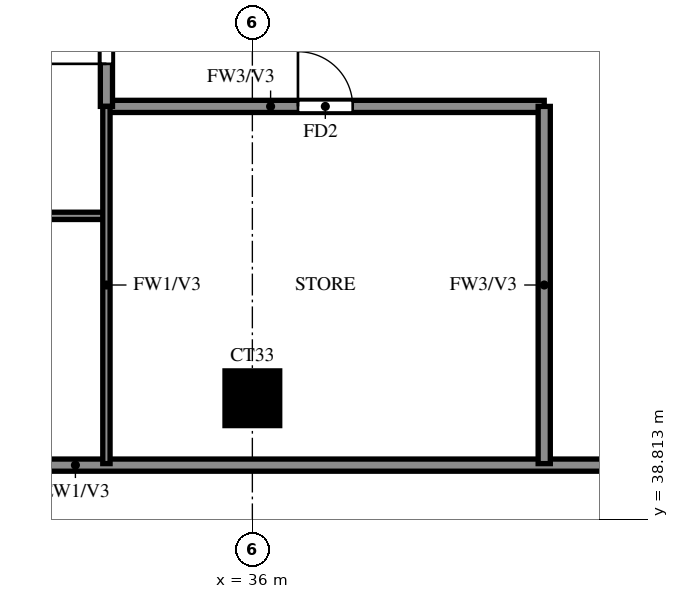
"""IFC4 building model, lengths in metres.
Left out: names, types, materials, properties, quantities, classifications, styles, units other than length and angle.
Written with IfcOpenShell. Run it as: python <this file> out.ifc"""

import sys

from ifc_helpers import new_model, si_unit, direction, frame, frame_2d, origin, origin_2d, place, context, subcontext, project, spatial, rectangle, extrude, source, transform, mapped, element, fill, save


model = new_model("IFC4")
c1 = context("Model", 3, precision=1e-05, world=origin(), true_north=direction((0.0, 1.0)))
c2 = subcontext(c1, "Body", "Model", "MODEL_VIEW")
j1 = project(units=[si_unit("LENGTHUNIT", "METRE"), si_unit("PLANEANGLEUNIT", "RADIAN")], contexts=[c1])
p1 = place(None, origin())
s1 = spatial("IfcSite", under=j1, at=p1, CompositionType="ELEMENT")
p2 = place(p1, origin())
s2 = spatial("IfcBuilding", under=s1, at=p2, CompositionType="ELEMENT")
p3 = place(p2, frame((0.0, 0.0, 229.0)))
s3 = spatial("IfcBuildingStorey", under=s2, at=p3, CompositionType="ELEMENT", Elevation=229.0)
m1 = source(origin(), c2, "Body", "SweptSolid", [
    extrude(rectangle(XDim=0.9, YDim=0.9, at=origin_2d()), origin(), (0.0, 0.0, 1.0), 3.22),
])
p4 = place(p3, frame((36.0, 40.8, 0.0), z_axis=(0.0, 0.0, 1.0), x_axis=(1.0, 0.0, 0.0)))
e1 = element("IfcColumn", 1, at=p4, inside=s3, PredefinedType="COLUMN", context=c2, shape_type="MappedRepresentation", body=[
    mapped(m1, transform((0.0, 0.0, 0.0))),
])
p5 = place(p3, frame((22.2, 39.7, 0.0), z_axis=(0.0, 0.0, 1.0), x_axis=(1.0, 0.0, 0.0)))
e2 = element("IfcWall", 2, at=p5, inside=s3, PredefinedType="SOLIDWALL", context=c2, shape_type="SweptSolid", body=[
    extrude(rectangle(XDim=19.8, YDim=0.2, at=frame_2d((9.9, 0.0))), origin(), (0.0, 0.0, 1.0), 3.22),
])
p6 = place(p5, frame((0.7, 0.0, 0.6)))
e3 = element("IfcOpeningElement", 3, at=p6, cuts=e2, PredefinedType="OPENING", context=c2, shape_type="SweptSolid", body=[
    extrude(rectangle(XDim=1.8, YDim=2.4, at=frame_2d((0.9, 1.2))), frame((0.0, 0.11, 0.0), z_axis=(0.0, -1.0, 0.0), x_axis=(1.0, 0.0, 0.0)), (0.0, 0.0, 1.0), 0.22),
])
p7 = place(p5, frame((3.6, 0.0, 0.6)))
e4 = element("IfcOpeningElement", 4, at=p7, cuts=e2, PredefinedType="OPENING", context=c2, shape_type="SweptSolid", body=[
    extrude(rectangle(XDim=2.4, YDim=2.4, at=frame_2d((1.2, 1.2))), frame((0.0, 0.11, 0.0), z_axis=(0.0, -1.0, 0.0), x_axis=(1.0, 0.0, 0.0)), (0.0, 0.0, 1.0), 0.22),
])
p8 = place(p5, frame((7.8, 0.0, 0.6)))
e5 = element("IfcOpeningElement", 5, at=p8, cuts=e2, PredefinedType="OPENING", context=c2, shape_type="SweptSolid", body=[
    extrude(rectangle(XDim=2.4, YDim=2.4, at=frame_2d((1.2, 1.2))), frame((0.0, 0.11, 0.0), z_axis=(0.0, -1.0, 0.0), x_axis=(1.0, 0.0, 0.0)), (0.0, 0.0, 1.0), 0.22),
])
p9 = place(p3, frame((33.6, 45.6, 0.0), z_axis=(0.0, 0.0, 1.0), x_axis=(1.0, 0.0, 0.0)))
e6 = element("IfcWall", 6, at=p9, inside=s3, PredefinedType="SOLIDWALL", context=c2, shape_type="SweptSolid", body=[
    extrude(rectangle(XDim=7.2, YDim=0.2, at=frame_2d((3.6, 0.0))), origin(), (0.0, 0.0, 1.0), 3.22),
])
p10 = place(p9, frame((3.15, 0.0, 0.0)))
e7 = element("IfcOpeningElement", 7, at=p10, cuts=e6, PredefinedType="OPENING", context=c2, shape_type="SweptSolid", body=[
    extrude(rectangle(XDim=0.9, YDim=2.1, at=frame_2d((0.45, 1.05))), frame((0.0, 0.11, 0.0), z_axis=(0.0, -1.0, 0.0), x_axis=(1.0, 0.0, 0.0)), (0.0, 0.0, 1.0), 0.22),
])
p11 = place(p3, frame((33.6, 45.6, 0.0), z_axis=(0.0, 0.0, 1.0), x_axis=(0.0, 1.0, 0.0)))
e8 = element("IfcWall", 8, at=p11, inside=s3, PredefinedType="SOLIDWALL", context=c2, shape_type="SweptSolid", body=[
    extrude(rectangle(XDim=12.0, YDim=0.2, at=frame_2d((6.0, 0.0))), origin(), (0.0, 0.0, 1.0), 3.22),
])
p12 = place(p11, frame((0.7, 0.0, 0.0)))
e9 = element("IfcOpeningElement", 9, at=p12, cuts=e8, PredefinedType="OPENING", context=c2, shape_type="SweptSolid", body=[
    extrude(rectangle(XDim=1.0, YDim=2.1, at=frame_2d((0.5, 1.05))), frame((0.0, 0.11, 0.0), z_axis=(0.0, -1.0, 0.0), x_axis=(1.0, 0.0, 0.0)), (0.0, 0.0, 1.0), 0.22),
])
p13 = place(p11, frame((10.3, 0.0, 0.0)))
e10 = element("IfcOpeningElement", 10, at=p13, cuts=e8, PredefinedType="OPENING", context=c2, shape_type="SweptSolid", body=[
    extrude(rectangle(XDim=1.0, YDim=2.1, at=frame_2d((0.5, 1.05))), frame((0.0, 0.11, 0.0), z_axis=(0.0, -1.0, 0.0), x_axis=(1.0, 0.0, 0.0)), (0.0, 0.0, 1.0), 0.22),
])
p14 = place(p3, frame((40.8, 39.725, 0.0), z_axis=(0.0, 0.0, 1.0), x_axis=(0.0, 1.0, 0.0)))
e11 = element("IfcWall", 11, at=p14, inside=s3, PredefinedType="SOLIDWALL", context=c2, shape_type="SweptSolid", body=[
    extrude(rectangle(XDim=5.875, YDim=0.2, at=frame_2d((2.938, 0.0))), origin(), (0.0, 0.0, 1.0), 3.22),
])
p15 = place(p3, frame((25.2, 43.8, 0.0), z_axis=(0.0, 0.0, 1.0), x_axis=(1.0, 0.0, 0.0)))
e12 = element("IfcWall", 12, at=p15, inside=s3, PredefinedType="PARTITIONING", context=c2, shape_type="SweptSolid", body=[
    extrude(rectangle(XDim=8.4, YDim=0.12, at=frame_2d((4.2, 0.0))), origin(), (0.0, 0.0, 1.0), 3.22),
])
p16 = place(p15, frame((1.35, 0.0, 0.0)))
e13 = element("IfcOpeningElement", 13, at=p16, cuts=e12, PredefinedType="OPENING", context=c2, shape_type="SweptSolid", body=[
    extrude(rectangle(XDim=0.9, YDim=2.1, at=frame_2d((0.45, 1.05))), frame((0.0, 0.07, 0.0), z_axis=(0.0, -1.0, 0.0), x_axis=(1.0, 0.0, 0.0)), (0.0, 0.0, 1.0), 0.14),
])
p17 = place(p15, frame((5.55, 0.0, 0.0)))
e14 = element("IfcOpeningElement", 14, at=p17, cuts=e12, PredefinedType="OPENING", context=c2, shape_type="SweptSolid", body=[
    extrude(rectangle(XDim=0.9, YDim=2.1, at=frame_2d((0.45, 1.05))), frame((0.0, 0.07, 0.0), z_axis=(0.0, -1.0, 0.0), x_axis=(1.0, 0.0, 0.0)), (0.0, 0.0, 1.0), 0.14),
])
p18 = place(p3, frame((33.6, 39.725, 0.0), z_axis=(0.0, 0.0, 1.0), x_axis=(0.0, 1.0, 0.0)))
e15 = element("IfcWall", 15, at=p18, inside=s3, PredefinedType="PARTITIONING", context=c2, shape_type="SweptSolid", body=[
    extrude(rectangle(XDim=5.875, YDim=0.12, at=frame_2d((2.938, 0.0))), origin(), (0.0, 0.0, 1.0), 3.22),
])
p19 = place(p12, origin())
e16 = element("IfcDoor", 16, at=p19, inside=s3, OperationType="SINGLE_SWING_LEFT", PredefinedType="DOOR", context=c2, shape_type="SweptSolid", body=[
    extrude(rectangle(XDim=1.0, YDim=2.1, at=frame_2d((0.5, 1.05))), frame((0.0, 0.025, 0.0), z_axis=(0.0, -1.0, 0.0), x_axis=(1.0, 0.0, 0.0)), (0.0, 0.0, 1.0), 0.05),
])
fill(e9, e16)
p20 = place(p10, origin())
e17 = element("IfcDoor", 17, at=p20, inside=s3, OperationType="SINGLE_SWING_LEFT", PredefinedType="DOOR", context=c2, shape_type="SweptSolid", body=[
    extrude(rectangle(XDim=0.9, YDim=2.1, at=frame_2d((0.45, 1.05))), frame((0.0, 0.025, 0.0), z_axis=(0.0, -1.0, 0.0), x_axis=(1.0, 0.0, 0.0)), (0.0, 0.0, 1.0), 0.05),
])
fill(e7, e17)
save(model, sys.argv[1])
